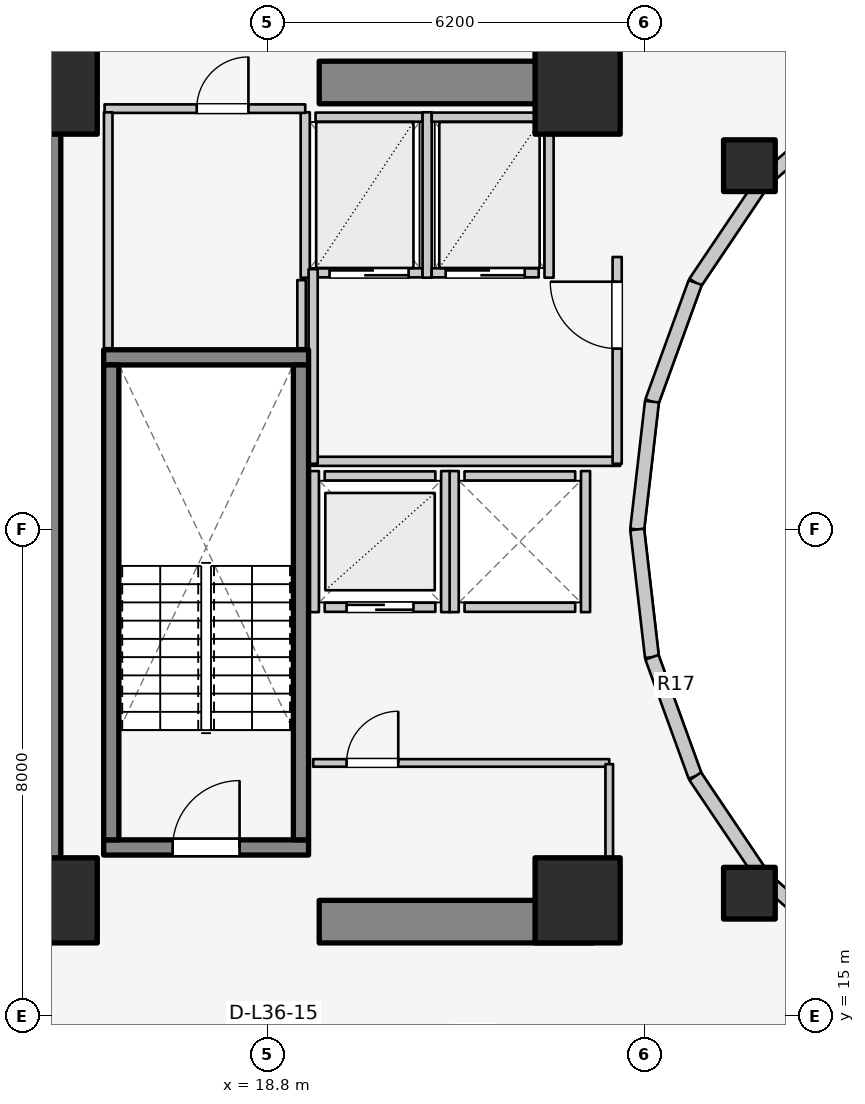
"""IFC4 building model, lengths in metres.
Left out: names, types, materials, properties, quantities, classifications, styles, units other than length and angle.
Written with IfcOpenShell. Run it as: python <this file> out.ifc"""

import sys

from ifc_helpers import new_model, si_unit, direction, frame, frame_2d, origin, origin_2d, place, context, subcontext, project, spatial, rectangle, extrude, element, fill, save


model = new_model("IFC4")
c1 = context("Model", 3, precision=1e-05, world=origin(), true_north=direction((0.0, 1.0)))
c2 = subcontext(c1, "Body", "Model", "MODEL_VIEW")
j1 = project(units=[si_unit("LENGTHUNIT", "METRE"), si_unit("PLANEANGLEUNIT", "RADIAN")], contexts=[c1])
p1 = place(None, origin())
s1 = spatial("IfcSite", under=j1, at=p1, CompositionType="ELEMENT")
p2 = place(p1, origin())
s2 = spatial("IfcBuilding", under=s1, at=p2, CompositionType="ELEMENT")
p3 = place(p2, frame((0.0, 0.0, 119.7)))
s3 = spatial("IfcBuildingStorey", under=s2, at=p3, CompositionType="ELEMENT", Elevation=119.7)
p4 = place(p3, frame((15.05, 17.05, 0.0), z_axis=(0.0, 0.0, 1.0), x_axis=(0.0, 1.0, 0.0)))
e1 = element("IfcWall", 1, at=p4, inside=s3, PredefinedType="SHEAR", context=c2, shape_type="SweptSolid", body=[
    extrude(rectangle(XDim=12.8, YDim=0.7, at=frame_2d((6.4, 0.0))), origin(), (0.0, 0.0, 1.0), 3.1),
])
for number, where, z_axis, x_axis in (
    (2, (19.65, 16.55, 0.0), (0.0, 0.0, 1.0), (1.0, 0.0, 0.0)),
    (3, (19.65, 30.35, 0.0), (0.0, 0.0, 1.0), (1.0, 0.0, 0.0)),
):
    element("IfcWall", number, at=place(p3, frame(where, z_axis=z_axis, x_axis=x_axis)), inside=s3, PredefinedType="SHEAR", context=c2, shape_type="SweptSolid", body=[
        extrude(rectangle(XDim=4.5, YDim=0.7, at=frame_2d((2.25, 0.0))), origin(), (0.0, 0.0, 1.0), 3.1),
    ])
p5 = place(p3, frame((16.105, 17.77, 0.0), z_axis=(0.0, 0.0, 1.0), x_axis=(1.0, 0.0, 0.0)))
e4 = element("IfcWall", 4, at=p5, inside=s3, PredefinedType="SOLIDWALL", context=c2, shape_type="SweptSolid", body=[
    extrude(rectangle(XDim=3.37, YDim=0.25, at=frame_2d((1.685, 0.0))), origin(), (0.0, 0.0, 1.0), 3.1),
])
p6 = place(p5, frame((1.135, 0.0, 0.0)))
e5 = element("IfcOpeningElement", 5, at=p6, cuts=e4, PredefinedType="OPENING", context=c2, shape_type="SweptSolid", body=[
    extrude(rectangle(XDim=1.1, YDim=2.1, at=frame_2d((0.55, 1.05))), frame((0.0, 0.135, 0.0), z_axis=(0.0, -1.0, 0.0), x_axis=(1.0, 0.0, 0.0)), (0.0, 0.0, 1.0), 0.27),
])
p7 = place(p3, frame((16.105, 25.83, 0.0), z_axis=(0.0, 0.0, 1.0), x_axis=(1.0, 0.0, 0.0)))
e6 = element("IfcWall", 6, at=p7, inside=s3, PredefinedType="SOLIDWALL", context=c2, shape_type="SweptSolid", body=[
    extrude(rectangle(XDim=3.37, YDim=0.25, at=frame_2d((1.685, 0.0))), origin(), (0.0, 0.0, 1.0), 3.1),
])
for number, where, z_axis, x_axis in (
    (7, (16.23, 17.895, 0.0), (0.0, 0.0, 1.0), (0.0, 1.0, 0.0)),
    (8, (19.35, 17.895, 0.0), (0.0, 0.0, 1.0), (0.0, 1.0, 0.0)),
):
    element("IfcWall", number, at=place(p3, frame(where, z_axis=z_axis, x_axis=x_axis)), inside=s3, PredefinedType="SOLIDWALL", context=c2, shape_type="SweptSolid", body=[
        extrude(rectangle(XDim=7.81, YDim=0.25, at=frame_2d((3.905, 0.0))), origin(), (0.0, 0.0, 1.0), 3.1),
    ])
for number, where, z_axis, x_axis in (
    (9, (15.3, 16.9, 0.0), (0.0, 0.0, 1.0), (1.0, 0.0, 0.0)),
    (10, (23.9, 16.9, 0.0), (0.0, 0.0, 1.0), (1.0, 0.0, 0.0)),
    (11, (23.9, 30.2, 0.0), (0.0, 0.0, 1.0), (1.0, 0.0, 0.0)),
    (12, (15.3, 30.2, 0.0), (0.0, 0.0, 1.0), (1.0, 0.0, 0.0)),
):
    element("IfcColumn", number, at=place(p3, frame(where, z_axis=z_axis, x_axis=x_axis)), inside=s3, PredefinedType="COLUMN", context=c2, shape_type="SweptSolid", body=[
        extrude(rectangle(XDim=1.4, YDim=1.4, at=origin_2d()), origin(), (0.0, 0.0, 1.0), 3.1),
    ])
for number, where, z_axis, x_axis in (
    (13, (26.725, 28.982, 0.0), (0.0, 0.0, 1.0), (1.0, 0.0, 0.0)),
    (14, (26.725, 17.018, 0.0), (0.0, 0.0, 1.0), (1.0, 0.0, 0.0)),
):
    element("IfcColumn", number, at=place(p3, frame(where, z_axis=z_axis, x_axis=x_axis)), inside=s3, PredefinedType="COLUMN", context=c2, shape_type="SweptSolid", body=[
        extrude(rectangle(XDim=0.85, YDim=0.85, at=origin_2d()), origin(), (0.0, 0.0, 1.0), 3.1),
    ])
p8 = place(p3, frame((28.44, 30.032, 0.0), z_axis=(0.0, 0.0, 1.0), x_axis=(-0.752576694707, -0.658504607869, 0.0)))
e15 = element("IfcWall", 15, at=p8, inside=s3, PredefinedType="STANDARD", context=c2, shape_type="SweptSolid", body=[
    extrude(rectangle(XDim=1.959, YDim=0.23, at=frame_2d((0.98, 0.0))), origin(), (0.0, 0.0, 1.0), 1.22),
])
p9 = place(p3, frame((26.965, 28.742, 0.0), z_axis=(0.0, 0.0, 1.0), x_axis=(-0.558197800898, -0.829707909492, 0.0)))
e16 = element("IfcWall", 16, at=p9, inside=s3, PredefinedType="STANDARD", context=c2, shape_type="SweptSolid", body=[
    extrude(rectangle(XDim=2.027, YDim=0.23, at=frame_2d((1.013, 0.0))), origin(), (0.0, 0.0, 1.0), 1.22),
])
p10 = place(p3, frame((25.834, 27.06, 0.0), z_axis=(0.0, 0.0, 1.0), x_axis=(-0.341423187295, -0.93990968033, 0.0)))
e17 = element("IfcWall", 17, at=p10, inside=s3, PredefinedType="STANDARD", context=c2, shape_type="SweptSolid", body=[
    extrude(rectangle(XDim=2.084, YDim=0.23, at=frame_2d((1.042, 0.0))), origin(), (0.0, 0.0, 1.0), 2.56),
])
for number, where, z_axis, x_axis in (
    (18, (25.123, 25.102, 0.0), (0.0, 0.0, 1.0), (-0.115, -0.993, 0.0)),
    (19, (24.88, 23.0, 0.0), (0.0, 0.0, 1.0), (0.115, -0.993, 0.0)),
):
    element("IfcWall", number, at=place(p3, frame(where, z_axis=z_axis, x_axis=x_axis)), inside=s3, PredefinedType="STANDARD", context=c2, shape_type="SweptSolid", body=[
        extrude(rectangle(XDim=2.115, YDim=0.23, at=frame_2d((1.058, 0.0))), origin(), (0.0, 0.0, 1.0), 2.56),
    ])
p11 = place(p3, frame((25.123, 20.898, 0.0), z_axis=(0.0, 0.0, 1.0), x_axis=(0.341423187295, -0.93990968033, 0.0)))
e20 = element("IfcWall", 20, at=p11, inside=s3, PredefinedType="STANDARD", context=c2, shape_type="SweptSolid", body=[
    extrude(rectangle(XDim=2.084, YDim=0.23, at=frame_2d((1.042, 0.0))), origin(), (0.0, 0.0, 1.0), 2.56),
])
p12 = place(p3, frame((25.834, 18.94, 0.0), z_axis=(0.0, 0.0, 1.0), x_axis=(0.558197800898, -0.829707909492, 0.0)))
e21 = element("IfcWall", 21, at=p12, inside=s3, PredefinedType="STANDARD", context=c2, shape_type="SweptSolid", body=[
    extrude(rectangle(XDim=2.027, YDim=0.23, at=frame_2d((1.013, 0.0))), origin(), (0.0, 0.0, 1.0), 1.22),
])
p13 = place(p3, frame((26.965, 17.258, 0.0), z_axis=(0.0, 0.0, 1.0), x_axis=(0.752576694707, -0.658504607869, 0.0)))
e22 = element("IfcWall", 22, at=p13, inside=s3, PredefinedType="STANDARD", context=c2, shape_type="SweptSolid", body=[
    extrude(rectangle(XDim=1.959, YDim=0.23, at=frame_2d((0.98, 0.0))), origin(), (0.0, 0.0, 1.0), 1.22),
])
p14 = place(p3, frame((19.74, 21.72, 0.0), z_axis=(0.0, 0.0, 1.0), x_axis=(1.0, 0.0, 0.0)))
e23 = element("IfcWall", 23, at=p14, inside=s3, PredefinedType="SOLIDWALL", context=c2, shape_type="SweptSolid", body=[
    extrude(rectangle(XDim=1.82, YDim=0.15, at=frame_2d((0.91, 0.0))), origin(), (0.0, 0.0, 1.0), 2.575),
])
p15 = place(p14, frame((0.36, 0.0, 0.0)))
e24 = element("IfcOpeningElement", 24, at=p15, cuts=e23, PredefinedType="OPENING", context=c2, shape_type="SweptSolid", body=[
    extrude(rectangle(XDim=1.1, YDim=2.1, at=frame_2d((0.55, 1.05))), frame((0.0, 0.085, 0.0), z_axis=(0.0, -1.0, 0.0), x_axis=(1.0, 0.0, 0.0)), (0.0, 0.0, 1.0), 0.17),
])
p16 = place(p3, frame((19.74, 23.88, 0.0), z_axis=(0.0, 0.0, 1.0), x_axis=(1.0, 0.0, 0.0)))
e25 = element("IfcWall", 25, at=p16, inside=s3, PredefinedType="SOLIDWALL", context=c2, shape_type="SweptSolid", body=[
    extrude(rectangle(XDim=1.82, YDim=0.15, at=frame_2d((0.91, 0.0))), origin(), (0.0, 0.0, 1.0), 2.575),
])
for number, where, z_axis, x_axis in (
    (26, (19.57, 21.64, 0.0), (0.0, 0.0, 1.0), (0.0, 1.0, 0.0)),
    (27, (21.73, 21.64, 0.0), (0.0, 0.0, 1.0), (0.0, 1.0, 0.0)),
):
    element("IfcWall", number, at=place(p3, frame(where, z_axis=z_axis, x_axis=x_axis)), inside=s3, PredefinedType="SOLIDWALL", context=c2, shape_type="SweptSolid", body=[
        extrude(rectangle(XDim=2.32, YDim=0.15, at=frame_2d((1.16, 0.0))), origin(), (0.0, 0.0, 1.0), 2.575),
    ])
for number, where, z_axis, x_axis in (
    (28, (22.04, 21.72, 0.0), (0.0, 0.0, 1.0), (1.0, 0.0, 0.0)),
    (29, (22.04, 23.88, 0.0), (0.0, 0.0, 1.0), (1.0, 0.0, 0.0)),
):
    element("IfcWall", number, at=place(p3, frame(where, z_axis=z_axis, x_axis=x_axis)), inside=s3, PredefinedType="SOLIDWALL", context=c2, shape_type="SweptSolid", body=[
        extrude(rectangle(XDim=1.82, YDim=0.15, at=frame_2d((0.91, 0.0))), origin(), (0.0, 0.0, 1.0), 2.12),
    ])
p17 = place(p3, frame((21.87, 21.64, 0.0), z_axis=(0.0, 0.0, 1.0), x_axis=(0.0, 1.0, 0.0)))
e30 = element("IfcWall", 30, at=p17, inside=s3, PredefinedType="SOLIDWALL", context=c2, shape_type="SweptSolid", body=[
    extrude(rectangle(XDim=2.32, YDim=0.15, at=frame_2d((1.16, 0.0))), origin(), (0.0, 0.0, 1.0), 2.575),
])
p18 = place(p3, frame((24.03, 21.64, 0.0), z_axis=(0.0, 0.0, 1.0), x_axis=(0.0, 1.0, 0.0)))
e31 = element("IfcWall", 31, at=p18, inside=s3, PredefinedType="SOLIDWALL", context=c2, shape_type="SweptSolid", body=[
    extrude(rectangle(XDim=2.32, YDim=0.15, at=frame_2d((1.16, 0.0))), origin(), (0.0, 0.0, 1.0), 2.12),
])
p19 = place(p3, frame((19.59, 27.22, 0.0), z_axis=(0.0, 0.0, 1.0), x_axis=(1.0, 0.0, 0.0)))
e32 = element("IfcWall", 32, at=p19, inside=s3, PredefinedType="SOLIDWALL", context=c2, shape_type="SweptSolid", body=[
    extrude(rectangle(XDim=1.76, YDim=0.15, at=frame_2d((0.88, 0.0))), origin(), (0.0, 0.0, 1.0), 2.575),
])
p20 = place(p19, frame((0.23, 0.0, 0.0)))
e33 = element("IfcOpeningElement", 33, at=p20, cuts=e32, PredefinedType="OPENING", context=c2, shape_type="SweptSolid", body=[
    extrude(rectangle(XDim=1.3, YDim=2.1, at=frame_2d((0.65, 1.05))), frame((0.0, 0.085, 0.0), z_axis=(0.0, -1.0, 0.0), x_axis=(1.0, 0.0, 0.0)), (0.0, 0.0, 1.0), 0.17),
])
p21 = place(p3, frame((19.59, 29.78, 0.0), z_axis=(0.0, 0.0, 1.0), x_axis=(1.0, 0.0, 0.0)))
e34 = element("IfcWall", 34, at=p21, inside=s3, PredefinedType="SOLIDWALL", context=c2, shape_type="SweptSolid", body=[
    extrude(rectangle(XDim=1.76, YDim=0.15, at=frame_2d((0.88, 0.0))), origin(), (0.0, 0.0, 1.0), 2.575),
])
for number, where, z_axis, x_axis in (
    (35, (19.42, 27.14, 0.0), (0.0, 0.0, 1.0), (0.0, 1.0, 0.0)),
    (36, (21.425, 27.14, 0.0), (0.0, 0.0, 1.0), (0.0, 1.0, 0.0)),
):
    element("IfcWall", number, at=place(p3, frame(where, z_axis=z_axis, x_axis=x_axis)), inside=s3, PredefinedType="SOLIDWALL", context=c2, shape_type="SweptSolid", body=[
        extrude(rectangle(XDim=2.72, YDim=0.15, at=frame_2d((1.36, 0.0))), origin(), (0.0, 0.0, 1.0), 2.575),
    ])
p22 = place(p3, frame((21.5, 27.22, 0.0), z_axis=(0.0, 0.0, 1.0), x_axis=(1.0, 0.0, 0.0)))
e37 = element("IfcWall", 37, at=p22, inside=s3, PredefinedType="SOLIDWALL", context=c2, shape_type="SweptSolid", body=[
    extrude(rectangle(XDim=1.76, YDim=0.15, at=frame_2d((0.88, 0.0))), origin(), (0.0, 0.0, 1.0), 2.575),
])
p23 = place(p22, frame((0.23, 0.0, 0.0)))
e38 = element("IfcOpeningElement", 38, at=p23, cuts=e37, PredefinedType="OPENING", context=c2, shape_type="SweptSolid", body=[
    extrude(rectangle(XDim=1.3, YDim=2.1, at=frame_2d((0.65, 1.05))), frame((0.0, 0.085, 0.0), z_axis=(0.0, -1.0, 0.0), x_axis=(1.0, 0.0, 0.0)), (0.0, 0.0, 1.0), 0.17),
])
p24 = place(p3, frame((21.5, 29.78, 0.0), z_axis=(0.0, 0.0, 1.0), x_axis=(1.0, 0.0, 0.0)))
e39 = element("IfcWall", 39, at=p24, inside=s3, PredefinedType="SOLIDWALL", context=c2, shape_type="SweptSolid", body=[
    extrude(rectangle(XDim=1.76, YDim=0.15, at=frame_2d((0.88, 0.0))), origin(), (0.0, 0.0, 1.0), 2.575),
])
p25 = place(p3, frame((23.43, 27.14, 0.0), z_axis=(0.0, 0.0, 1.0), x_axis=(0.0, 1.0, 0.0)))
e40 = element("IfcWall", 40, at=p25, inside=s3, PredefinedType="SOLIDWALL", context=c2, shape_type="SweptSolid", body=[
    extrude(rectangle(XDim=2.72, YDim=0.15, at=frame_2d((1.36, 0.0))), origin(), (0.0, 0.0, 1.0), 2.575),
])
p26 = place(p3, frame((19.52, 24.12, 0.0), z_axis=(0.0, 0.0, 1.0), x_axis=(1.0, 0.0, 0.0)))
e41 = element("IfcWall", 41, at=p26, inside=s3, PredefinedType="PARTITIONING", context=c2, shape_type="SweptSolid", body=[
    extrude(rectangle(XDim=5.08, YDim=0.15, at=frame_2d((2.54, 0.0))), origin(), (0.0, 0.0, 1.0), 2.12),
])
p27 = place(p3, frame((19.55, 24.08, 0.0), z_axis=(0.0, 0.0, 1.0), x_axis=(0.0, 1.0, 0.0)))
e42 = element("IfcWall", 42, at=p27, inside=s3, PredefinedType="PARTITIONING", context=c2, shape_type="SweptSolid", body=[
    extrude(rectangle(XDim=3.2, YDim=0.15, at=frame_2d((1.6, 0.0))), origin(), (0.0, 0.0, 1.0), 2.575),
])
p28 = place(p3, frame((24.55, 24.08, 0.0), z_axis=(0.0, 0.0, 1.0), x_axis=(0.0, 1.0, 0.0)))
e43 = element("IfcWall", 43, at=p28, inside=s3, PredefinedType="PARTITIONING", context=c2, shape_type="SweptSolid", body=[
    extrude(rectangle(XDim=3.4, YDim=0.15, at=frame_2d((1.7, 0.0))), origin(), (0.0, 0.0, 1.0), 2.575),
])
p29 = place(p28, frame((1.894, 0.0, 0.0)))
e44 = element("IfcOpeningElement", 44, at=p29, cuts=e43, PredefinedType="OPENING", context=c2, shape_type="SweptSolid", body=[
    extrude(rectangle(XDim=1.1, YDim=2.1, at=frame_2d((0.55, 1.05))), frame((0.0, 0.085, 0.0), z_axis=(0.0, -1.0, 0.0), x_axis=(1.0, 0.0, 0.0)), (0.0, 0.0, 1.0), 0.17),
])
p30 = place(p3, frame((19.55, 19.16, 0.0), z_axis=(0.0, 0.0, 1.0), x_axis=(1.0, 0.0, 0.0)))
e45 = element("IfcWall", 45, at=p30, inside=s3, PredefinedType="PARTITIONING", context=c2, shape_type="SweptSolid", body=[
    extrude(rectangle(XDim=4.87, YDim=0.125, at=frame_2d((2.435, 0.0))), origin(), (0.0, 0.0, 1.0), 2.12),
])
p31 = place(p30, frame((0.55, 0.0, 0.0)))
e46 = element("IfcOpeningElement", 46, at=p31, cuts=e45, PredefinedType="OPENING", context=c2, shape_type="SweptSolid", body=[
    extrude(rectangle(XDim=0.85, YDim=2.05, at=frame_2d((0.425, 1.025))), frame((0.0, 0.073, 0.0), z_axis=(0.0, -1.0, 0.0), x_axis=(1.0, 0.0, 0.0)), (0.0, 0.0, 1.0), 0.145),
])
p32 = place(p3, frame((24.42, 17.1, 0.0), z_axis=(0.0, 0.0, 1.0), x_axis=(0.0, 1.0, 0.0)))
e47 = element("IfcWall", 47, at=p32, inside=s3, PredefinedType="PARTITIONING", context=c2, shape_type="SweptSolid", body=[
    extrude(rectangle(XDim=2.04, YDim=0.125, at=frame_2d((1.02, 0.0))), origin(), (0.0, 0.0, 1.0), 1.873),
])
p33 = place(p3, frame((16.12, 29.92, 0.0), z_axis=(0.0, 0.0, 1.0), x_axis=(1.0, 0.0, 0.0)))
e48 = element("IfcWall", 48, at=p33, inside=s3, PredefinedType="PLUMBINGWALL", context=c2, shape_type="SweptSolid", body=[
    extrude(rectangle(XDim=3.3, YDim=0.14, at=frame_2d((1.65, 0.0))), origin(), (0.0, 0.0, 1.0), 2.575),
])
p34 = place(p33, frame((1.516, 0.0, 0.0)))
e49 = element("IfcOpeningElement", 49, at=p34, cuts=e48, PredefinedType="OPENING", context=c2, shape_type="SweptSolid", body=[
    extrude(rectangle(XDim=0.85, YDim=2.05, at=frame_2d((0.425, 1.025))), frame((0.0, 0.08, 0.0), z_axis=(0.0, -1.0, 0.0), x_axis=(1.0, 0.0, 0.0)), (0.0, 0.0, 1.0), 0.16),
])
p35 = place(p3, frame((16.18, 25.98, 0.0), z_axis=(0.0, 0.0, 1.0), x_axis=(0.0, 1.0, 0.0)))
e50 = element("IfcWall", 50, at=p35, inside=s3, PredefinedType="PLUMBINGWALL", context=c2, shape_type="SweptSolid", body=[
    extrude(rectangle(XDim=3.88, YDim=0.14, at=frame_2d((1.94, 0.0))), origin(), (0.0, 0.0, 1.0), 2.575),
])
p36 = place(p3, frame((19.36, 25.98, 0.0), z_axis=(0.0, 0.0, 1.0), x_axis=(0.0, 1.0, 0.0)))
e51 = element("IfcWall", 51, at=p36, inside=s3, PredefinedType="PLUMBINGWALL", context=c2, shape_type="SweptSolid", body=[
    extrude(rectangle(XDim=1.12, YDim=0.14, at=frame_2d((0.56, 0.0))), origin(), (0.0, 0.0, 1.0), 2.575),
])
p37 = place(p3, frame((28.45, 15.985, 0.0), z_axis=(0.0, 0.0, 1.0), x_axis=(-0.524565340045, -0.851370192116, 0.0)))
e52 = element("IfcWall", 52, at=p37, inside=s3, PredefinedType="PARTITIONING", context=c2, shape_type="SweptSolid", body=[
    extrude(rectangle(XDim=3.027, YDim=0.125, at=frame_2d((1.514, 0.0))), origin(), (0.0, 0.0, 1.0), 1.992),
])
p38 = place(p6, origin())
e53 = element("IfcDoor", 53, at=p38, inside=s3, OperationType="SINGLE_SWING_RIGHT", PredefinedType="DOOR", context=c2, shape_type="SweptSolid", body=[
    extrude(rectangle(XDim=1.1, YDim=2.1, at=frame_2d((0.55, 1.05))), frame((0.0, 0.025, 0.0), z_axis=(0.0, -1.0, 0.0), x_axis=(1.0, 0.0, 0.0)), (0.0, 0.0, 1.0), 0.05),
])
fill(e5, e53)
p39 = place(p15, origin())
e54 = element("IfcDoor", 54, at=p39, inside=s3, OperationType="DOUBLE_DOOR_SLIDING", PredefinedType="DOOR", context=c2, shape_type="SweptSolid", body=[
    extrude(rectangle(XDim=1.1, YDim=2.1, at=frame_2d((0.55, 1.05))), frame((0.0, 0.025, 0.0), z_axis=(0.0, -1.0, 0.0), x_axis=(1.0, 0.0, 0.0)), (0.0, 0.0, 1.0), 0.05),
])
fill(e24, e54)
p40 = place(p20, origin())
e55 = element("IfcDoor", 55, at=p40, inside=s3, OperationType="DOUBLE_DOOR_SLIDING", PredefinedType="DOOR", context=c2, shape_type="SweptSolid", body=[
    extrude(rectangle(XDim=1.3, YDim=2.1, at=frame_2d((0.65, 1.05))), frame((0.0, 0.025, 0.0), z_axis=(0.0, -1.0, 0.0), x_axis=(1.0, 0.0, 0.0)), (0.0, 0.0, 1.0), 0.05),
])
fill(e33, e55)
p41 = place(p23, origin())
e56 = element("IfcDoor", 56, at=p41, inside=s3, OperationType="DOUBLE_DOOR_SLIDING", PredefinedType="DOOR", context=c2, shape_type="SweptSolid", body=[
    extrude(rectangle(XDim=1.3, YDim=2.1, at=frame_2d((0.65, 1.05))), frame((0.0, 0.025, 0.0), z_axis=(0.0, -1.0, 0.0), x_axis=(1.0, 0.0, 0.0)), (0.0, 0.0, 1.0), 0.05),
])
fill(e38, e56)
p42 = place(p29, origin())
e57 = element("IfcDoor", 57, at=p42, inside=s3, OperationType="SINGLE_SWING_RIGHT", PredefinedType="DOOR", context=c2, shape_type="SweptSolid", body=[
    extrude(rectangle(XDim=1.1, YDim=2.1, at=frame_2d((0.55, 1.05))), frame((0.0, 0.025, 0.0), z_axis=(0.0, -1.0, 0.0), x_axis=(1.0, 0.0, 0.0)), (0.0, 0.0, 1.0), 0.05),
])
fill(e44, e57)
p43 = place(p31, origin())
e58 = element("IfcDoor", 58, at=p43, inside=s3, OperationType="SINGLE_SWING_RIGHT", PredefinedType="DOOR", context=c2, shape_type="SweptSolid", body=[
    extrude(rectangle(XDim=0.85, YDim=2.05, at=frame_2d((0.425, 1.025))), frame((0.0, 0.025, 0.0), z_axis=(0.0, -1.0, 0.0), x_axis=(1.0, 0.0, 0.0)), (0.0, 0.0, 1.0), 0.05),
])
fill(e46, e58)
p44 = place(p34, origin())
e59 = element("IfcDoor", 59, at=p44, inside=s3, OperationType="SINGLE_SWING_RIGHT", PredefinedType="DOOR", context=c2, shape_type="SweptSolid", body=[
    extrude(rectangle(XDim=0.85, YDim=2.05, at=frame_2d((0.425, 1.025))), frame((0.0, 0.025, 0.0), z_axis=(0.0, -1.0, 0.0), x_axis=(1.0, 0.0, 0.0)), (0.0, 0.0, 1.0), 0.05),
])
fill(e49, e59)
save(model, sys.argv[1])
